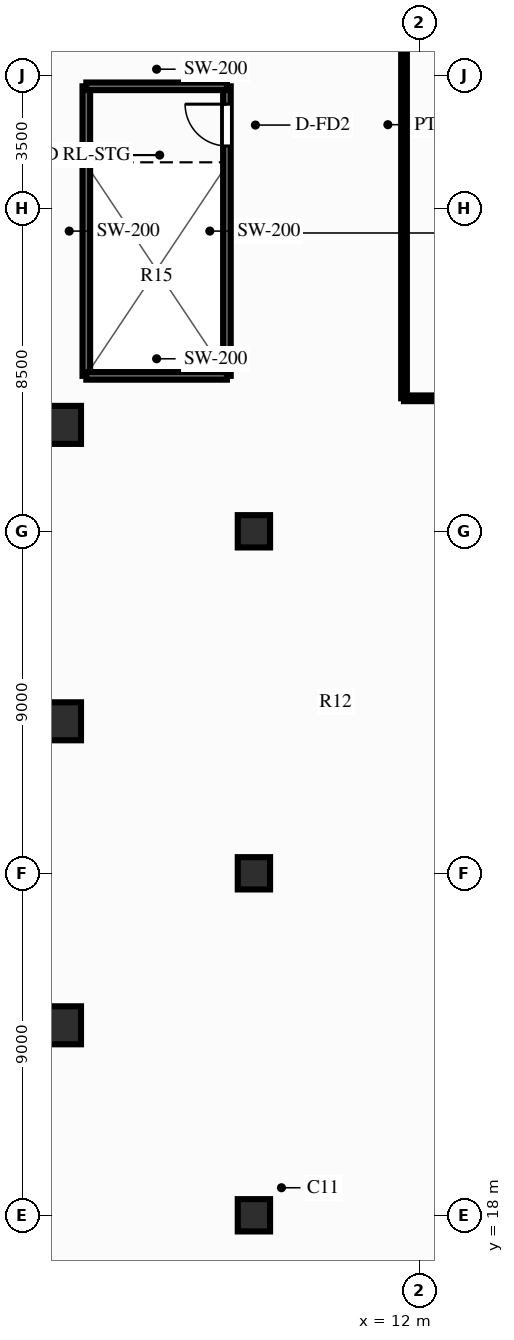
"""IFC4 building model, lengths in metres.
Left out: names, types, materials, properties, quantities, classifications, styles, units other than length and angle.
Written with IfcOpenShell. Run it as: python <this file> out.ifc"""

import sys

from ifc_helpers import new_model, si_unit, direction, frame, frame_2d, origin, origin_2d, place, context, subcontext, project, spatial, rectangle, circle, extrude, source, transform, mapped, element, fill, save


model = new_model("IFC4")
c1 = context("Model", 3, precision=1e-05, world=origin(), true_north=direction((0.0, 1.0)))
c2 = subcontext(c1, "Body", "Model", "MODEL_VIEW")
j1 = project(units=[si_unit("LENGTHUNIT", "METRE"), si_unit("PLANEANGLEUNIT", "RADIAN")], contexts=[c1])
p1 = place(None, origin())
s1 = spatial("IfcSite", under=j1, at=p1, CompositionType="ELEMENT")
p2 = place(p1, origin())
s2 = spatial("IfcBuilding", under=s1, at=p2, CompositionType="ELEMENT")
p3 = place(p2, frame((0.0, 0.0, 15.0)))
s3 = spatial("IfcBuildingStorey", under=s2, at=p3, CompositionType="ELEMENT", Elevation=15.0)
m1 = source(origin(), c2, "Body", "SweptSolid", [
    extrude(circle(Radius=0.5, at=origin_2d()), origin(), (0.0, 0.0, 1.0), 4.4),
])
for number, where, z_axis, x_axis in (
    (1, (2.6, 23.0, 0.0), (0.0, 0.0, 1.0), (1.0, 0.0, 0.0)),
    (2, (2.6, 31.0, 0.0), (0.0, 0.0, 1.0), (1.0, 0.0, 0.0)),
    (3, (2.6, 38.8, 0.0), (0.0, 0.0, 1.0), (1.0, 0.0, 0.0)),
):
    element("IfcColumn", number, at=place(p3, frame(where, z_axis=z_axis, x_axis=x_axis)), inside=s3, PredefinedType="COLUMN", context=c2, shape_type="MappedRepresentation", body=[
        mapped(m1, transform((0.0, 0.0, 0.0), scale=1.0)),
    ])
m2 = source(origin(), c2, "Body", "SweptSolid", [
    extrude(circle(Radius=0.425, at=origin_2d()), origin(), (0.0, 0.0, 1.0), 4.4),
])
for number, where, z_axis, x_axis in (
    (4, (7.65, 18.0, 0.0), (0.0, 0.0, 1.0), (1.0, 0.0, 0.0)),
    (5, (7.65, 27.0, 0.0), (0.0, 0.0, 1.0), (1.0, 0.0, 0.0)),
    (6, (7.65, 36.0, 0.0), (0.0, 0.0, 1.0), (1.0, 0.0, 0.0)),
):
    element("IfcColumn", number, at=place(p3, frame(where, z_axis=z_axis, x_axis=x_axis)), inside=s3, PredefinedType="COLUMN", context=c2, shape_type="MappedRepresentation", body=[
        mapped(m2, transform((0.0, 0.0, 0.0), scale=1.0)),
    ])
p4 = place(p3, frame((3.24, 40.09, 0.0), z_axis=(0.0, 0.0, 1.0), x_axis=(0.0, 1.0, 0.0)))
e7 = element("IfcWall", 7, at=p4, inside=s3, PredefinedType="SOLIDWALL", context=c2, shape_type="SweptSolid", body=[
    extrude(rectangle(XDim=7.62, YDim=0.2, at=frame_2d((3.81, 0.0))), origin(), (0.0, 0.0, 1.0), 4.19),
])
p5 = place(p3, frame((6.94, 40.09, 0.0), z_axis=(0.0, 0.0, 1.0), x_axis=(0.0, 1.0, 0.0)))
e8 = element("IfcWall", 8, at=p5, inside=s3, PredefinedType="SOLIDWALL", context=c2, shape_type="SweptSolid", body=[
    extrude(rectangle(XDim=7.62, YDim=0.2, at=frame_2d((3.81, 0.0))), origin(), (0.0, 0.0, 1.0), 4.19),
])
p6 = place(p5, frame((7.15, 0.0, 0.0), z_axis=(0.0, 0.0, 1.0), x_axis=(-1.0, 0.0, 0.0)))
e9 = element("IfcOpeningElement", 9, at=p6, cuts=e8, PredefinedType="OPENING", context=c2, shape_type="SweptSolid", body=[
    extrude(rectangle(XDim=1.1, YDim=2.15, at=frame_2d((0.55, 1.075))), frame((0.0, 0.112, 0.0), z_axis=(0.0, -1.0, 0.0), x_axis=(1.0, 0.0, 0.0)), (0.0, 0.0, 1.0), 0.224),
])
for number, where, z_axis, x_axis in (
    (10, (3.24, 40.09, 0.0), (0.0, 0.0, 1.0), (1.0, 0.0, 0.0)),
    (11, (3.24, 47.71, 0.0), (0.0, 0.0, 1.0), (1.0, 0.0, 0.0)),
):
    element("IfcWall", number, at=place(p3, frame(where, z_axis=z_axis, x_axis=x_axis)), inside=s3, PredefinedType="SOLIDWALL", context=c2, shape_type="SweptSolid", body=[
        extrude(rectangle(XDim=3.7, YDim=0.2, at=frame_2d((1.85, 0.0))), origin(), (0.0, 0.0, 1.0), 4.19),
    ])
p7 = place(p3, frame((11.6, 39.5, 0.0), z_axis=(0.0, 0.0, 1.0), x_axis=(1.0, 0.0, 0.0)))
e12 = element("IfcWall", 12, at=p7, inside=s3, PredefinedType="PARTITIONING", context=c2, shape_type="SweptSolid", body=[
    extrude(rectangle(XDim=26.9, YDim=0.15, at=frame_2d((13.45, 0.0))), origin(), (0.0, 0.0, 1.0), 4.08),
])
p8 = place(p7, frame((9.575, 0.0, 0.0)))
e13 = element("IfcOpeningElement", 13, at=p8, cuts=e12, PredefinedType="OPENING", context=c2, shape_type="SweptSolid", body=[
    extrude(rectangle(XDim=1.6, YDim=2.15, at=frame_2d((0.8, 1.075))), frame((0.0, 0.087, 0.0), z_axis=(0.0, -1.0, 0.0), x_axis=(1.0, 0.0, 0.0)), (0.0, 0.0, 1.0), 0.174),
])
p9 = place(p3, frame((11.6, 39.5, 0.0), z_axis=(0.0, 0.0, 1.0), x_axis=(0.0, 1.0, 0.0)))
e14 = element("IfcWall", 14, at=p9, inside=s3, PredefinedType="PARTITIONING", context=c2, shape_type="SweptSolid", body=[
    extrude(rectangle(XDim=14.4, YDim=0.15, at=frame_2d((7.2, 0.0))), origin(), (0.0, 0.0, 1.0), 2.94),
])
m3 = source(origin(), c2, "Body", "SweptSolid", [
    extrude(rectangle(XDim=1.1, YDim=2.15, at=frame_2d((0.55, 1.075))), frame((0.0, 0.025, 0.0), z_axis=(0.0, -1.0, 0.0), x_axis=(1.0, 0.0, 0.0)), (0.0, 0.0, 1.0), 0.05),
])
p10 = place(p6, origin())
e15 = element("IfcDoor", 15, at=p10, inside=s3, OperationType="SINGLE_SWING_LEFT", PredefinedType="DOOR", context=c2, shape_type="MappedRepresentation", body=[
    mapped(m3, transform((0.0, 0.0, 0.0), scale=1.0)),
])
fill(e9, e15)
save(model, sys.argv[1])
